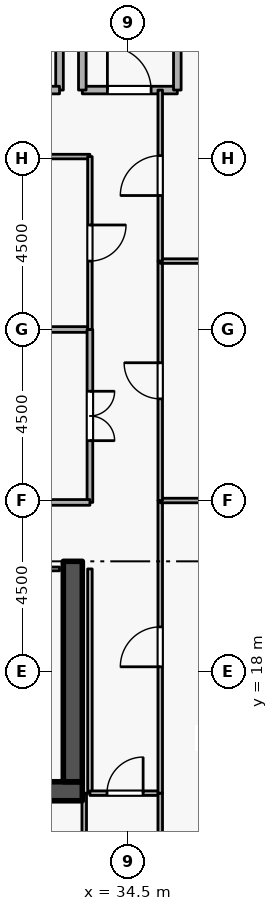
"""IFC4 building model, lengths in metres.
Left out: names, types, materials, properties, quantities, classifications, styles, units other than length and angle.
Written with IfcOpenShell. Run it as: python <this file> out.ifc"""

import sys

from ifc_helpers import new_model, si_unit, direction, frame, frame_2d, origin, place, context, subcontext, project, spatial, rectangle, extrude, element, fill, save


model = new_model("IFC4")
c1 = context("Model", 3, precision=1e-05, world=origin(), true_north=direction((0.0, 1.0)))
c2 = subcontext(c1, "Body", "Model", "MODEL_VIEW")
j1 = project(units=[si_unit("LENGTHUNIT", "METRE"), si_unit("PLANEANGLEUNIT", "RADIAN")], contexts=[c1])
p1 = place(None, origin())
s1 = spatial("IfcSite", under=j1, at=p1, CompositionType="ELEMENT")
p2 = place(p1, origin())
s2 = spatial("IfcBuilding", under=s1, at=p2, CompositionType="ELEMENT")
p3 = place(p2, frame((0.0, 0.0, 210.9)))
s3 = spatial("IfcBuildingStorey", under=s2, at=p3, CompositionType="ELEMENT", Elevation=210.9)
p4 = place(p3, frame((17.7, 14.85, 0.0), z_axis=(0.0, 0.0, 1.0), x_axis=(1.0, 0.0, 0.0)))
e1 = element("IfcWall", 1, at=p4, inside=s3, PredefinedType="SHEAR", context=c2, shape_type="SweptSolid", body=[
    extrude(rectangle(XDim=15.6, YDim=0.5, at=frame_2d((7.8, 0.0))), origin(), (0.0, 0.0, 1.0), 3.6),
])
p5 = place(p3, frame((33.05, 15.1, 0.0), z_axis=(0.0, 0.0, 1.0), x_axis=(0.0, 1.0, 0.0)))
e2 = element("IfcWall", 2, at=p5, inside=s3, PredefinedType="SHEAR", context=c2, shape_type="SweptSolid", body=[
    extrude(rectangle(XDim=5.8, YDim=0.5, at=frame_2d((2.9, 0.0))), origin(), (0.0, 0.0, 1.0), 3.6),
])
p6 = place(p3, frame((33.3, 33.3, 0.0), z_axis=(0.0, 0.0, 1.0), x_axis=(1.0, 0.0, 0.0)))
e3 = element("IfcWall", 3, at=p6, inside=s3, PredefinedType="STANDARD", context=c2, shape_type="SweptSolid", body=[
    extrude(rectangle(XDim=2.5, YDim=0.2, at=frame_2d((1.25, 0.0))), origin(), (0.0, 0.0, 1.0), 3.34),
])
p7 = place(p6, frame((0.66, 0.0, 0.0)))
e4 = element("IfcOpeningElement", 4, at=p7, cuts=e3, PredefinedType="OPENING", context=c2, shape_type="SweptSolid", body=[
    extrude(rectangle(XDim=1.15, YDim=2.1, at=frame_2d((0.575, 1.05))), frame((0.0, 0.11, 0.0), z_axis=(0.0, -1.0, 0.0), x_axis=(1.0, 0.0, 0.0)), (0.0, 0.0, 1.0), 0.22),
])
p8 = place(p3, frame((35.8, 33.3, 0.0), z_axis=(0.0, 0.0, 1.0), x_axis=(0.0, 1.0, 0.0)))
e5 = element("IfcWall", 5, at=p8, inside=s3, PredefinedType="STANDARD", context=c2, shape_type="SweptSolid", body=[
    extrude(rectangle(XDim=5.7, YDim=0.2, at=frame_2d((2.85, 0.0))), origin(), (0.0, 0.0, 1.0), 3.34),
])
p9 = place(p3, frame((33.3, 35.6, 0.0), z_axis=(0.0, 0.0, 1.0), x_axis=(0.0, -1.0, 0.0)))
e6 = element("IfcWall", 6, at=p9, inside=s3, PredefinedType="STANDARD", context=c2, shape_type="SweptSolid", body=[
    extrude(rectangle(XDim=2.3, YDim=0.2, at=frame_2d((1.15, 0.0))), origin(), (0.0, 0.0, 1.0), 2.545),
])
p10 = place(p3, frame((32.7, 35.35, 0.0), z_axis=(0.0, 0.0, 1.0), x_axis=(0.0, -1.0, 0.0)))
e7 = element("IfcWall", 7, at=p10, inside=s3, PredefinedType="STANDARD", context=c2, shape_type="SweptSolid", body=[
    extrude(rectangle(XDim=2.05, YDim=0.2, at=frame_2d((1.025, 0.0))), origin(), (0.0, 0.0, 1.0), 2.545),
])
p11 = place(p3, frame((32.7, 33.3, 0.0), z_axis=(0.0, 0.0, 1.0), x_axis=(-1.0, 0.0, 0.0)))
e8 = element("IfcWall", 8, at=p11, inside=s3, PredefinedType="STANDARD", context=c2, shape_type="SweptSolid", body=[
    extrude(rectangle(XDim=2.35, YDim=0.2, at=frame_2d((1.175, 0.0))), origin(), (0.0, 0.0, 1.0), 3.34),
])
p12 = place(p11, frame((0.6, 0.0, 0.0)))
e9 = element("IfcOpeningElement", 9, at=p12, cuts=e8, PredefinedType="OPENING", context=c2, shape_type="SweptSolid", body=[
    extrude(rectangle(XDim=1.15, YDim=2.1, at=frame_2d((0.575, 1.05))), frame((0.0, 0.11, 0.0), z_axis=(0.0, -1.0, 0.0), x_axis=(1.0, 0.0, 0.0)), (0.0, 0.0, 1.0), 0.22),
])
p13 = place(p3, frame((30.55, 20.7, 0.0), z_axis=(0.0, 0.0, 1.0), x_axis=(1.0, 0.0, 0.0)))
e10 = element("IfcWall", 10, at=p13, inside=s3, PredefinedType="PARTITIONING", context=c2, shape_type="SweptSolid", body=[
    extrude(rectangle(XDim=2.15, YDim=0.1, at=frame_2d((1.075, 0.0))), origin(), (0.0, 0.0, 1.0), 3.34),
])
p14 = place(p13, frame((0.6, 0.0, 0.0)))
e11 = element("IfcOpeningElement", 11, at=p14, cuts=e10, PredefinedType="OPENING", context=c2, shape_type="SweptSolid", body=[
    extrude(rectangle(XDim=0.95, YDim=2.1, at=frame_2d((0.475, 1.05))), frame((0.0, 0.06, 0.0), z_axis=(0.0, -1.0, 0.0), x_axis=(1.0, 0.0, 0.0)), (0.0, 0.0, 1.0), 0.12),
])
p15 = place(p3, frame((33.5, 20.7, 0.0), z_axis=(0.0, 0.0, 1.0), x_axis=(0.0, -1.0, 0.0)))
e12 = element("IfcWall", 12, at=p15, inside=s3, PredefinedType="PARTITIONING", context=c2, shape_type="SweptSolid", body=[
    extrude(rectangle(XDim=5.9, YDim=0.12, at=frame_2d((2.95, 0.0))), origin(), (0.0, 0.0, 1.0), 3.34),
])
p16 = place(p3, frame((33.5, 14.8, 0.0), z_axis=(0.0, 0.0, 1.0), x_axis=(1.0, 0.0, 0.0)))
e13 = element("IfcWall", 13, at=p16, inside=s3, PredefinedType="PARTITIONING", context=c2, shape_type="SweptSolid", body=[
    extrude(rectangle(XDim=1.85, YDim=0.12, at=frame_2d((0.925, 0.0))), origin(), (0.0, 0.0, 1.0), 3.34),
])
p17 = place(p16, frame((0.45, 0.0, 0.0)))
e14 = element("IfcOpeningElement", 14, at=p17, cuts=e13, PredefinedType="OPENING", context=c2, shape_type="SweptSolid", body=[
    extrude(rectangle(XDim=0.95, YDim=2.1, at=frame_2d((0.475, 1.05))), frame((0.0, 0.07, 0.0), z_axis=(0.0, -1.0, 0.0), x_axis=(1.0, 0.0, 0.0)), (0.0, 0.0, 1.0), 0.14),
])
for number, where, z_axis, x_axis in (
    (15, (35.35, 14.8, 0.0), (0.0, 0.0, 1.0), (0.0, -1.0, 0.0)),
    (16, (33.35, 9.28, 0.0), (0.0, 0.0, 1.0), (0.0, 1.0, 0.0)),
):
    element("IfcWall", number, at=place(p3, frame(where, z_axis=z_axis, x_axis=x_axis)), inside=s3, PredefinedType="PARTITIONING", context=c2, shape_type="SweptSolid", body=[
        extrude(rectangle(XDim=5.52, YDim=0.12, at=frame_2d((2.76, 0.0))), origin(), (0.0, 0.0, 1.0), 3.34),
    ])
p18 = place(p3, frame((35.35, 14.8, 0.0), z_axis=(0.0, 0.0, 1.0), x_axis=(0.0, 1.0, 0.0)))
e17 = element("IfcWall", 17, at=p18, inside=s3, PredefinedType="PARTITIONING", context=c2, shape_type="SweptSolid", body=[
    extrude(rectangle(XDim=7.7, YDim=0.12, at=frame_2d((3.85, 0.0))), origin(), (0.0, 0.0, 1.0), 3.34),
])
p19 = place(p18, frame((3.325, 0.0, 0.0)))
e18 = element("IfcOpeningElement", 18, at=p19, cuts=e17, PredefinedType="OPENING", context=c2, shape_type="SweptSolid", body=[
    extrude(rectangle(XDim=1.05, YDim=2.1, at=frame_2d((0.525, 1.05))), frame((0.0, 0.07, 0.0), z_axis=(0.0, -1.0, 0.0), x_axis=(1.0, 0.0, 0.0)), (0.0, 0.0, 1.0), 0.14),
])
p20 = place(p3, frame((35.35, 22.5, 0.0), z_axis=(0.0, 0.0, 1.0), x_axis=(1.0, 0.0, 0.0)))
e19 = element("IfcWall", 19, at=p20, inside=s3, PredefinedType="PARTITIONING", context=c2, shape_type="SweptSolid", body=[
    extrude(rectangle(XDim=7.87, YDim=0.12, at=frame_2d((3.935, 0.0))), origin(), (0.0, 0.0, 1.0), 3.34),
])
p21 = place(p3, frame((35.35, 22.5, 0.0), z_axis=(0.0, 0.0, 1.0), x_axis=(0.0, 1.0, 0.0)))
e20 = element("IfcWall", 20, at=p21, inside=s3, PredefinedType="PARTITIONING", context=c2, shape_type="SweptSolid", body=[
    extrude(rectangle(XDim=6.3, YDim=0.12, at=frame_2d((3.15, 0.0))), origin(), (0.0, 0.0, 1.0), 3.34),
])
p22 = place(p21, frame((2.675, 0.0, 0.0)))
e21 = element("IfcOpeningElement", 21, at=p22, cuts=e20, PredefinedType="OPENING", context=c2, shape_type="SweptSolid", body=[
    extrude(rectangle(XDim=0.95, YDim=2.1, at=frame_2d((0.475, 1.05))), frame((0.0, 0.07, 0.0), z_axis=(0.0, -1.0, 0.0), x_axis=(1.0, 0.0, 0.0)), (0.0, 0.0, 1.0), 0.14),
])
p23 = place(p3, frame((35.35, 28.8, 0.0), z_axis=(0.0, 0.0, 1.0), x_axis=(1.0, 0.0, 0.0)))
e22 = element("IfcWall", 22, at=p23, inside=s3, PredefinedType="PARTITIONING", context=c2, shape_type="SweptSolid", body=[
    extrude(rectangle(XDim=7.87, YDim=0.12, at=frame_2d((3.935, 0.0))), origin(), (0.0, 0.0, 1.0), 3.34),
])
p24 = place(p3, frame((35.35, 28.8, 0.0), z_axis=(0.0, 0.0, 1.0), x_axis=(0.0, 1.0, 0.0)))
e23 = element("IfcWall", 23, at=p24, inside=s3, PredefinedType="PARTITIONING", context=c2, shape_type="SweptSolid", body=[
    extrude(rectangle(XDim=4.5, YDim=0.12, at=frame_2d((2.25, 0.0))), origin(), (0.0, 0.0, 1.0), 3.34),
])
p25 = place(p24, frame((1.725, 0.0, 0.0)))
e24 = element("IfcOpeningElement", 24, at=p25, cuts=e23, PredefinedType="OPENING", context=c2, shape_type="SweptSolid", body=[
    extrude(rectangle(XDim=1.05, YDim=2.1, at=frame_2d((0.525, 1.05))), frame((0.0, 0.07, 0.0), z_axis=(0.0, -1.0, 0.0), x_axis=(1.0, 0.0, 0.0)), (0.0, 0.0, 1.0), 0.14),
])
p26 = place(p3, frame((30.7, 27.0, 0.0), z_axis=(0.0, 0.0, 1.0), x_axis=(1.0, 0.0, 0.0)))
e25 = element("IfcWall", 25, at=p26, inside=s3, PredefinedType="PARTITIONING", context=c2, shape_type="SweptSolid", body=[
    extrude(rectangle(XDim=2.8, YDim=0.15, at=frame_2d((1.4, 0.0))), origin(), (0.0, 0.0, 1.0), 2.878),
])
p27 = place(p3, frame((33.5, 27.0, 0.0), z_axis=(0.0, 0.0, 1.0), x_axis=(0.0, -1.0, 0.0)))
e26 = element("IfcWall", 26, at=p27, inside=s3, PredefinedType="PARTITIONING", context=c2, shape_type="SweptSolid", body=[
    extrude(rectangle(XDim=4.55, YDim=0.15, at=frame_2d((2.275, 0.0))), origin(), (0.0, 0.0, 1.0), 3.34),
])
p28 = place(p27, frame((1.625, 0.0, 0.0)))
e27 = element("IfcOpeningElement", 27, at=p28, cuts=e26, PredefinedType="OPENING", context=c2, shape_type="SweptSolid", body=[
    extrude(rectangle(XDim=1.3, YDim=2.12, at=frame_2d((0.65, 1.06))), frame((0.0, 0.085, 0.0), z_axis=(0.0, -1.0, 0.0), x_axis=(1.0, 0.0, 0.0)), (0.0, 0.0, 1.0), 0.17),
])
p29 = place(p3, frame((33.5, 22.45, 0.0), z_axis=(0.0, 0.0, 1.0), x_axis=(-1.0, 0.0, 0.0)))
e28 = element("IfcWall", 28, at=p29, inside=s3, PredefinedType="PARTITIONING", context=c2, shape_type="SweptSolid", body=[
    extrude(rectangle(XDim=2.8, YDim=0.15, at=frame_2d((1.4, 0.0))), origin(), (0.0, 0.0, 1.0), 3.34),
])
p30 = place(p3, frame((30.7, 31.55, 0.0), z_axis=(0.0, 0.0, 1.0), x_axis=(1.0, 0.0, 0.0)))
e29 = element("IfcWall", 29, at=p30, inside=s3, PredefinedType="PARTITIONING", context=c2, shape_type="SweptSolid", body=[
    extrude(rectangle(XDim=2.8, YDim=0.12, at=frame_2d((1.4, 0.0))), origin(), (0.0, 0.0, 1.0), 3.34),
])
p31 = place(p3, frame((33.5, 31.55, 0.0), z_axis=(0.0, 0.0, 1.0), x_axis=(0.0, -1.0, 0.0)))
e30 = element("IfcWall", 30, at=p31, inside=s3, PredefinedType="PARTITIONING", context=c2, shape_type="SweptSolid", body=[
    extrude(rectangle(XDim=4.55, YDim=0.12, at=frame_2d((2.275, 0.0))), origin(), (0.0, 0.0, 1.0), 3.34),
])
p32 = place(p31, frame((1.8, 0.0, 0.0)))
e31 = element("IfcOpeningElement", 31, at=p32, cuts=e30, PredefinedType="OPENING", context=c2, shape_type="SweptSolid", body=[
    extrude(rectangle(XDim=0.95, YDim=2.1, at=frame_2d((0.475, 1.05))), frame((0.0, 0.07, 0.0), z_axis=(0.0, -1.0, 0.0), x_axis=(1.0, 0.0, 0.0)), (0.0, 0.0, 1.0), 0.14),
])
p33 = place(p7, origin())
e32 = element("IfcDoor", 32, at=p33, inside=s3, OperationType="SINGLE_SWING_LEFT", PredefinedType="DOOR", context=c2, shape_type="SweptSolid", body=[
    extrude(rectangle(XDim=1.15, YDim=2.1, at=frame_2d((0.575, 1.05))), frame((0.0, 0.025, 0.0), z_axis=(0.0, -1.0, 0.0), x_axis=(1.0, 0.0, 0.0)), (0.0, 0.0, 1.0), 0.05),
])
fill(e4, e32)
p34 = place(p17, origin())
e33 = element("IfcDoor", 33, at=p34, inside=s3, OperationType="SINGLE_SWING_RIGHT", PredefinedType="DOOR", context=c2, shape_type="SweptSolid", body=[
    extrude(rectangle(XDim=0.95, YDim=2.1, at=frame_2d((0.475, 1.05))), frame((0.0, 0.025, 0.0), z_axis=(0.0, -1.0, 0.0), x_axis=(1.0, 0.0, 0.0)), (0.0, 0.0, 1.0), 0.05),
])
fill(e14, e33)
p35 = place(p19, origin())
e34 = element("IfcDoor", 34, at=p35, inside=s3, OperationType="SINGLE_SWING_LEFT", PredefinedType="DOOR", context=c2, shape_type="SweptSolid", body=[
    extrude(rectangle(XDim=1.05, YDim=2.1, at=frame_2d((0.525, 1.05))), frame((0.0, 0.025, 0.0), z_axis=(0.0, -1.0, 0.0), x_axis=(1.0, 0.0, 0.0)), (0.0, 0.0, 1.0), 0.05),
])
fill(e18, e34)
p36 = place(p22, origin())
e35 = element("IfcDoor", 35, at=p36, inside=s3, OperationType="SINGLE_SWING_RIGHT", PredefinedType="DOOR", context=c2, shape_type="SweptSolid", body=[
    extrude(rectangle(XDim=0.95, YDim=2.1, at=frame_2d((0.475, 1.05))), frame((0.0, 0.025, 0.0), z_axis=(0.0, -1.0, 0.0), x_axis=(1.0, 0.0, 0.0)), (0.0, 0.0, 1.0), 0.05),
])
fill(e21, e35)
p37 = place(p25, origin())
e36 = element("IfcDoor", 36, at=p37, inside=s3, OperationType="SINGLE_SWING_LEFT", PredefinedType="DOOR", context=c2, shape_type="SweptSolid", body=[
    extrude(rectangle(XDim=1.05, YDim=2.1, at=frame_2d((0.525, 1.05))), frame((0.0, 0.025, 0.0), z_axis=(0.0, -1.0, 0.0), x_axis=(1.0, 0.0, 0.0)), (0.0, 0.0, 1.0), 0.05),
])
fill(e24, e36)
p38 = place(p28, origin())
e37 = element("IfcDoor", 37, at=p38, inside=s3, OperationType="DOUBLE_DOOR_SINGLE_SWING", PredefinedType="DOOR", context=c2, shape_type="SweptSolid", body=[
    extrude(rectangle(XDim=1.3, YDim=2.12, at=frame_2d((0.65, 1.06))), frame((0.0, 0.025, 0.0), z_axis=(0.0, -1.0, 0.0), x_axis=(1.0, 0.0, 0.0)), (0.0, 0.0, 1.0), 0.05),
])
fill(e27, e37)
p39 = place(p32, origin())
e38 = element("IfcDoor", 38, at=p39, inside=s3, OperationType="SINGLE_SWING_LEFT", PredefinedType="DOOR", context=c2, shape_type="SweptSolid", body=[
    extrude(rectangle(XDim=0.95, YDim=2.1, at=frame_2d((0.475, 1.05))), frame((0.0, 0.025, 0.0), z_axis=(0.0, -1.0, 0.0), x_axis=(1.0, 0.0, 0.0)), (0.0, 0.0, 1.0), 0.05),
])
fill(e31, e38)
save(model, sys.argv[1])
